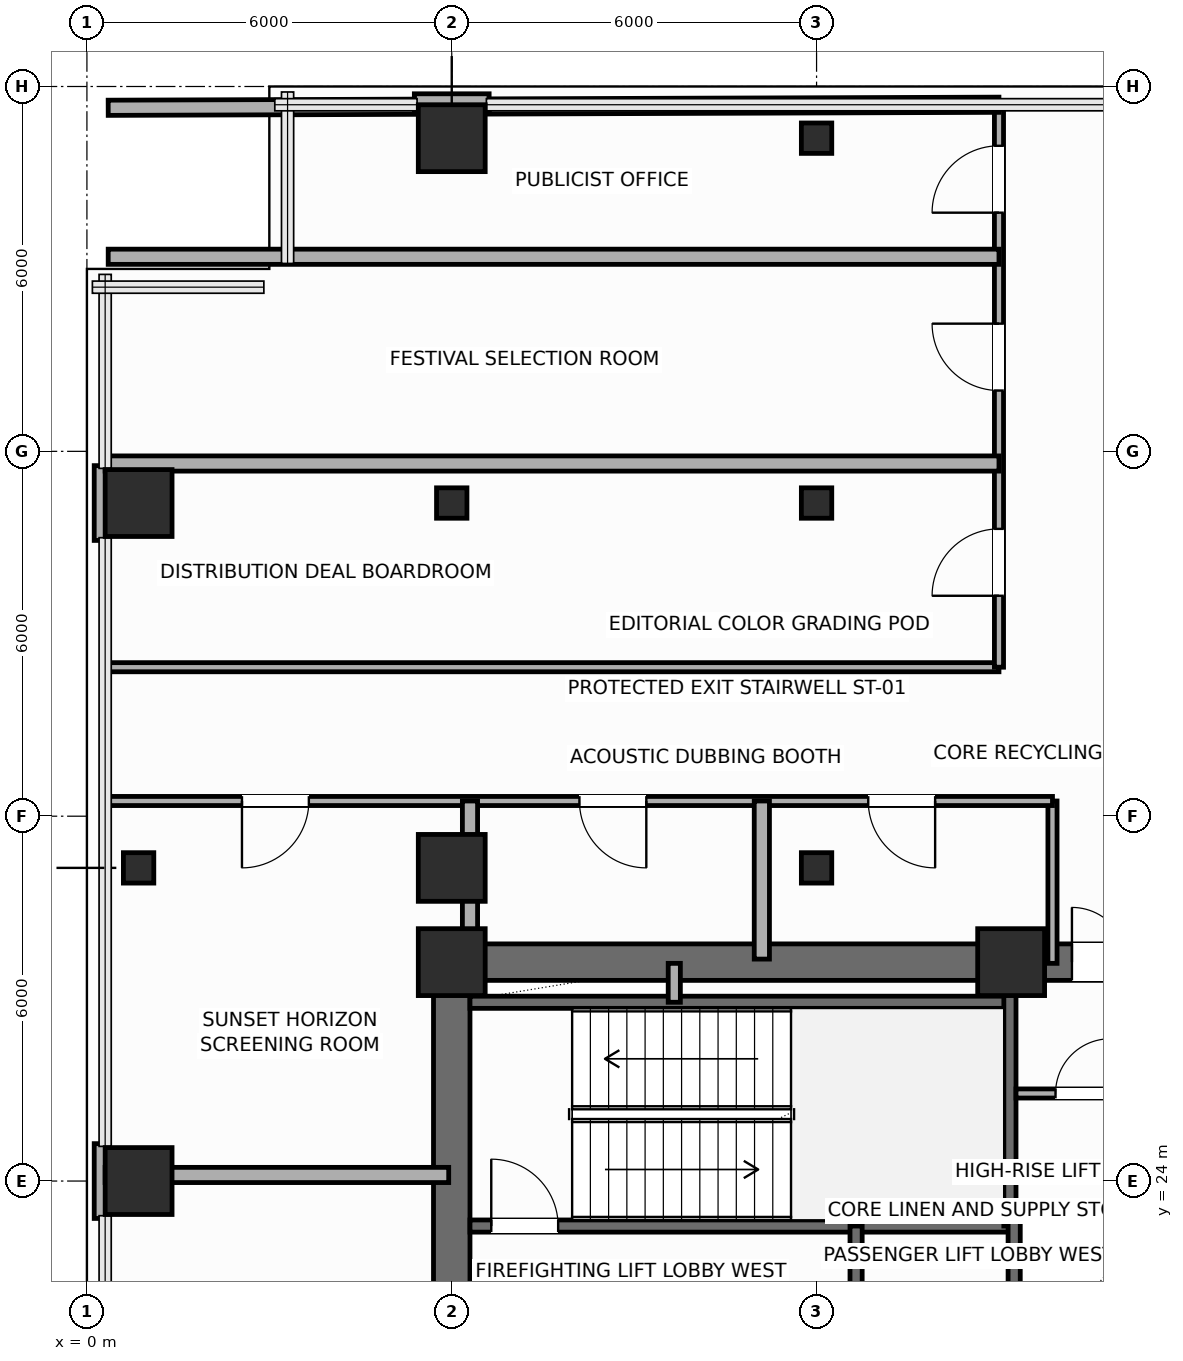
"""IFC4 building model, lengths in metres.
Left out: names, types, materials, properties, quantities, classifications, styles, units other than length and angle.
Written with IfcOpenShell. Run it as: python <this file> out.ifc"""

import sys

from ifc_helpers import new_model, si_unit, direction, frame, frame_2d, origin, origin_2d, place, context, subcontext, project, spatial, rectangle, hollow_rectangle, extrude, element, fill, save


model = new_model("IFC4")
c1 = context("Model", 3, precision=1e-05, world=origin(), true_north=direction((0.0, 1.0)))
c2 = subcontext(c1, "Body", "Model", "MODEL_VIEW")
j1 = project(units=[si_unit("LENGTHUNIT", "METRE"), si_unit("PLANEANGLEUNIT", "RADIAN")], contexts=[c1])
p1 = place(None, origin())
s1 = spatial("IfcSite", under=j1, at=p1, CompositionType="ELEMENT")
p2 = place(p1, origin())
s2 = spatial("IfcBuilding", under=s1, at=p2, CompositionType="ELEMENT")
p3 = place(p2, frame((0.0, 0.0, 126.9)))
s3 = spatial("IfcBuildingStorey", under=s2, at=p3, CompositionType="ELEMENT", Elevation=126.9)
for number, where, z_axis, x_axis in (
    (1, (6.0, 27.6, 0.0), (0.0, 0.0, 1.0), (1.0, 0.0, 0.0)),
    (2, (15.2, 27.6, 0.0), (0.0, 0.0, 1.0), (1.0, 0.0, 0.0)),
    (3, (0.85, 24.0, 0.0), (0.0, 0.0, 1.0), (1.0, 0.0, 0.0)),
):
    element("IfcColumn", number, at=place(p3, frame(where, z_axis=z_axis, x_axis=x_axis)), inside=s3, PredefinedType="COLUMN", context=c2, shape_type="SweptSolid", body=[
        extrude(rectangle(XDim=1.1, YDim=1.1, at=origin_2d()), origin(), (0.0, 0.0, 1.0), 3.75),
    ])
p4 = place(p3, frame((0.85, 29.15, 0.0), z_axis=(0.0, 0.0, 1.0), x_axis=(1.0, 0.0, 0.0)))
e4 = element("IfcColumn", 4, at=p4, inside=s3, PredefinedType="COLUMN", context=c2, shape_type="SweptSolid", body=[
    extrude(hollow_rectangle(XDim=0.5, YDim=0.5, WallThickness=0.025, InnerFilletRadius=0.025, OuterFilletRadius=0.04, at=origin_2d()), origin(), (0.0, 0.0, 1.0), 3.75),
])
for number, where, z_axis, x_axis in (
    (5, (0.85, 35.15, 0.0), (0.0, 0.0, 1.0), (1.0, 0.0, 0.0)),
    (6, (6.0, 29.15, 0.0), (0.0, 0.0, 1.0), (1.0, 0.0, 0.0)),
):
    element("IfcColumn", number, at=place(p3, frame(where, z_axis=z_axis, x_axis=x_axis)), inside=s3, PredefinedType="COLUMN", context=c2, shape_type="SweptSolid", body=[
        extrude(rectangle(XDim=1.1, YDim=1.1, at=origin_2d()), origin(), (0.0, 0.0, 1.0), 3.75),
    ])
p5 = place(p3, frame((6.0, 35.15, 0.0), z_axis=(0.0, 0.0, 1.0), x_axis=(1.0, 0.0, 0.0)))
e7 = element("IfcColumn", 7, at=p5, inside=s3, PredefinedType="COLUMN", context=c2, shape_type="SweptSolid", body=[
    extrude(hollow_rectangle(XDim=0.5, YDim=0.5, WallThickness=0.025, InnerFilletRadius=0.025, OuterFilletRadius=0.04, at=origin_2d()), origin(), (0.0, 0.0, 1.0), 3.75),
])
p6 = place(p3, frame((6.0, 41.15, 0.0), z_axis=(0.0, 0.0, 1.0), x_axis=(1.0, 0.0, 0.0)))
e8 = element("IfcColumn", 8, at=p6, inside=s3, PredefinedType="COLUMN", context=c2, shape_type="SweptSolid", body=[
    extrude(rectangle(XDim=1.1, YDim=1.1, at=origin_2d()), origin(), (0.0, 0.0, 1.0), 3.75),
])
for number, where, z_axis, x_axis in (
    (9, (12.0, 29.15, 0.0), (0.0, 0.0, 1.0), (1.0, 0.0, 0.0)),
    (10, (12.0, 35.15, 0.0), (0.0, 0.0, 1.0), (1.0, 0.0, 0.0)),
    (11, (12.0, 41.15, 0.0), (0.0, 0.0, 1.0), (1.0, 0.0, 0.0)),
):
    element("IfcColumn", number, at=place(p3, frame(where, z_axis=z_axis, x_axis=x_axis)), inside=s3, PredefinedType="COLUMN", context=c2, shape_type="SweptSolid", body=[
        extrude(hollow_rectangle(XDim=0.5, YDim=0.5, WallThickness=0.025, InnerFilletRadius=0.025, OuterFilletRadius=0.04, at=origin_2d()), origin(), (0.0, 0.0, 1.0), 3.75),
    ])
for number, where, z_axis, x_axis in (
    (12, (0.24, 23.385, 0.0), (0.0, 0.0, 1.0), (0.0, 1.0, 0.0)),
    (13, (0.24, 34.535, 0.0), (0.0, 0.0, 1.0), (0.0, 1.0, 0.0)),
    (14, (5.385, 41.76, 0.0), (0.0, 0.0, 1.0), (1.0, 0.0, 0.0)),
):
    element("IfcWall", number, at=place(p3, frame(where, z_axis=z_axis, x_axis=x_axis)), inside=s3, PredefinedType="SOLIDWALL", context=c2, shape_type="SweptSolid", body=[
        extrude(rectangle(XDim=1.23, YDim=0.24, at=frame_2d((0.615, 0.0))), origin(), (0.0, 0.0, 1.0), 3.525),
    ])
p7 = place(p3, frame((6.0, 27.6, 0.0), z_axis=(0.0, 0.0, 1.0), x_axis=(1.0, 0.0, 0.0)))
e15 = element("IfcWall", 15, at=p7, inside=s3, PredefinedType="SHEAR", context=c2, shape_type="SweptSolid", body=[
    extrude(rectangle(XDim=12.0, YDim=0.6, at=frame_2d((6.0, 0.0))), origin(), (0.0, 0.0, 1.0), 3.525),
])
p8 = place(p7, frame((10.2, 0.0, 0.0)))
e16 = element("IfcOpeningElement", 16, at=p8, cuts=e15, PredefinedType="OPENING", context=c2, shape_type="SweptSolid", body=[
    extrude(rectangle(XDim=0.9, YDim=2.15, at=frame_2d((0.45, 1.075))), frame((0.0, 0.31, 0.0), z_axis=(0.0, -1.0, 0.0), x_axis=(1.0, 0.0, 0.0)), (0.0, 0.0, 1.0), 0.62),
])
p9 = place(p3, frame((6.0, 18.0, 0.0), z_axis=(0.0, 0.0, 1.0), x_axis=(0.0, 1.0, 0.0)))
e17 = element("IfcWall", 17, at=p9, inside=s3, PredefinedType="SHEAR", context=c2, shape_type="SweptSolid", body=[
    extrude(rectangle(XDim=9.6, YDim=0.6, at=frame_2d((4.8, 0.0))), origin(), (0.0, 0.0, 1.0), 3.525),
])
p10 = place(p3, frame((6.3, 23.26, 0.0), z_axis=(0.0, 0.0, 1.0), x_axis=(1.0, 0.0, 0.0)))
e18 = element("IfcWall", 18, at=p10, inside=s3, PredefinedType="SHEAR", context=c2, shape_type="SweptSolid", body=[
    extrude(rectangle(XDim=8.88, YDim=0.2, at=frame_2d((4.44, 0.0))), origin(), (0.0, 0.0, 1.0), 3.525),
])
p11 = place(p10, frame((0.35, 0.0, 0.0)))
e19 = element("IfcOpeningElement", 19, at=p11, cuts=e18, PredefinedType="OPENING", context=c2, shape_type="SweptSolid", body=[
    extrude(rectangle(XDim=1.1, YDim=2.2, at=frame_2d((0.55, 1.1))), frame((0.0, 0.11, 0.0), z_axis=(0.0, -1.0, 0.0), x_axis=(1.0, 0.0, 0.0)), (0.0, 0.0, 1.0), 0.22),
])
p12 = place(p3, frame((6.3, 26.94, 0.0), z_axis=(0.0, 0.0, 1.0), x_axis=(1.0, 0.0, 0.0)))
e20 = element("IfcWall", 20, at=p12, inside=s3, PredefinedType="SHEAR", context=c2, shape_type="SweptSolid", body=[
    extrude(rectangle(XDim=8.88, YDim=0.2, at=frame_2d((4.44, 0.0))), origin(), (0.0, 0.0, 1.0), 3.525),
])
p13 = place(p3, frame((15.18, 23.26, 0.0), z_axis=(0.0, 0.0, 1.0), x_axis=(0.0, 1.0, 0.0)))
e21 = element("IfcWall", 21, at=p13, inside=s3, PredefinedType="SHEAR", context=c2, shape_type="SweptSolid", body=[
    extrude(rectangle(XDim=4.04, YDim=0.2, at=frame_2d((2.02, 0.0))), origin(), (0.0, 0.0, 1.0), 3.525),
])
p14 = place(p3, frame((12.65, 20.42, 0.0), z_axis=(0.0, 0.0, 1.0), x_axis=(0.0, 1.0, 0.0)))
e22 = element("IfcWall", 22, at=p14, inside=s3, PredefinedType="SHEAR", context=c2, shape_type="SweptSolid", body=[
    extrude(rectangle(XDim=2.84, YDim=0.2, at=frame_2d((1.42, 0.0))), origin(), (0.0, 0.0, 1.0), 3.525),
])
p15 = place(p14, frame((0.9, 0.0, 0.0)))
e23 = element("IfcOpeningElement", 23, at=p15, cuts=e22, PredefinedType="OPENING", context=c2, shape_type="SweptSolid", body=[
    extrude(rectangle(XDim=0.9, YDim=2.15, at=frame_2d((0.45, 1.075))), frame((0.0, 0.11, 0.0), z_axis=(0.0, -1.0, 0.0), x_axis=(1.0, 0.0, 0.0)), (0.0, 0.0, 1.0), 0.22),
])
p16 = place(p3, frame((9.66, 26.94, 0.0), z_axis=(0.0, 0.0, 1.0), x_axis=(0.0, 1.0, 0.0)))
e24 = element("IfcWall", 24, at=p16, inside=s3, PredefinedType="SOLIDWALL", context=c2, shape_type="SweptSolid", body=[
    extrude(rectangle(XDim=0.64, YDim=0.2, at=frame_2d((0.32, 0.0))), origin(), (0.0, 0.0, 1.0), 3.525),
])
p17 = place(p3, frame((15.25, 18.25, 0.0), z_axis=(0.0, 0.0, 1.0), x_axis=(0.0, 1.0, 0.0)))
e25 = element("IfcWall", 25, at=p17, inside=s3, PredefinedType="SHEAR", context=c2, shape_type="SweptSolid", body=[
    extrude(rectangle(XDim=5.2, YDim=0.2, at=frame_2d((2.6, 0.0))), origin(), (0.0, 0.0, 1.0), 3.525),
])
p18 = place(p3, frame((15.25, 23.45, 0.0), z_axis=(0.0, 0.0, 1.0), x_axis=(1.0, 0.0, 0.0)))
e26 = element("IfcWall", 26, at=p18, inside=s3, PredefinedType="SHEAR", context=c2, shape_type="SweptSolid", body=[
    extrude(rectangle(XDim=2.45, YDim=0.2, at=frame_2d((1.225, 0.0))), origin(), (0.0, 0.0, 1.0), 3.525),
])
p19 = place(p3, frame((15.28, 25.44, 0.0), z_axis=(0.0, 0.0, 1.0), x_axis=(1.0, 0.0, 0.0)))
e27 = element("IfcWall", 27, at=p19, inside=s3, PredefinedType="PARTITIONING", context=c2, shape_type="SweptSolid", body=[
    extrude(rectangle(XDim=2.42, YDim=0.15, at=frame_2d((1.21, 0.0))), origin(), (0.0, 0.0, 1.0), 3.525),
])
p20 = place(p19, frame((0.65, 0.0, 0.0)))
e28 = element("IfcOpeningElement", 28, at=p20, cuts=e27, PredefinedType="OPENING", context=c2, shape_type="SweptSolid", body=[
    extrude(rectangle(XDim=0.9, YDim=2.15, at=frame_2d((0.45, 1.075))), frame((0.0, 0.085, 0.0), z_axis=(0.0, -1.0, 0.0), x_axis=(1.0, 0.0, 0.0)), (0.0, 0.0, 1.0), 0.17),
])
p21 = place(p3, frame((15.88, 27.58, 0.0), z_axis=(0.0, 0.0, 1.0), x_axis=(0.0, 1.0, 0.0)))
e29 = element("IfcWall", 29, at=p21, inside=s3, PredefinedType="PARTITIONING", context=c2, shape_type="SweptSolid", body=[
    extrude(rectangle(XDim=2.67, YDim=0.15, at=frame_2d((1.335, 0.0))), origin(), (0.0, 0.0, 1.0), 3.525),
])
p22 = place(p3, frame((15.88, 30.25, 0.0), z_axis=(0.0, 0.0, 1.0), x_axis=(-1.0, 0.0, 0.0)))
e30 = element("IfcWall", 30, at=p22, inside=s3, PredefinedType="PARTITIONING", context=c2, shape_type="SweptSolid", body=[
    extrude(rectangle(XDim=15.58, YDim=0.15, at=frame_2d((7.79, 0.0))), origin(), (0.0, 0.0, 1.0), 3.525),
])
p23 = place(p22, frame((12.23, 0.0, 0.0)))
e31 = element("IfcOpeningElement", 31, at=p23, cuts=e30, PredefinedType="OPENING", context=c2, shape_type="SweptSolid", body=[
    extrude(rectangle(XDim=1.1, YDim=2.25, at=frame_2d((0.55, 1.125))), frame((0.0, 0.085, 0.0), z_axis=(0.0, -1.0, 0.0), x_axis=(1.0, 0.0, 0.0)), (0.0, 0.0, 1.0), 0.17),
])
p24 = place(p22, frame((6.68, 0.0, 0.0)))
e32 = element("IfcOpeningElement", 32, at=p24, cuts=e30, PredefinedType="OPENING", context=c2, shape_type="SweptSolid", body=[
    extrude(rectangle(XDim=1.1, YDim=2.25, at=frame_2d((0.55, 1.125))), frame((0.0, 0.085, 0.0), z_axis=(0.0, -1.0, 0.0), x_axis=(1.0, 0.0, 0.0)), (0.0, 0.0, 1.0), 0.17),
])
p25 = place(p22, frame((1.93, 0.0, 0.0)))
e33 = element("IfcOpeningElement", 33, at=p25, cuts=e30, PredefinedType="OPENING", context=c2, shape_type="SweptSolid", body=[
    extrude(rectangle(XDim=1.1, YDim=2.25, at=frame_2d((0.55, 1.125))), frame((0.0, 0.085, 0.0), z_axis=(0.0, -1.0, 0.0), x_axis=(1.0, 0.0, 0.0)), (0.0, 0.0, 1.0), 0.17),
])
p26 = place(p3, frame((0.3, 32.45, 0.0), z_axis=(0.0, 0.0, 1.0), x_axis=(1.0, 0.0, 0.0)))
e34 = element("IfcWall", 34, at=p26, inside=s3, PredefinedType="PARTITIONING", context=c2, shape_type="SweptSolid", body=[
    extrude(rectangle(XDim=14.7, YDim=0.15, at=frame_2d((7.35, 0.0))), origin(), (0.0, 0.0, 1.0), 3.525),
])
p27 = place(p3, frame((15.0, 32.45, 0.0), z_axis=(0.0, 0.0, 1.0), x_axis=(0.0, 1.0, 0.0)))
e35 = element("IfcWall", 35, at=p27, inside=s3, PredefinedType="PARTITIONING", context=c2, shape_type="SweptSolid", body=[
    extrude(rectangle(XDim=9.25, YDim=0.15, at=frame_2d((4.625, 0.0))), origin(), (0.0, 0.0, 1.0), 3.525),
])
p28 = place(p27, frame((1.175, 0.0, 0.0)))
e36 = element("IfcOpeningElement", 36, at=p28, cuts=e35, PredefinedType="OPENING", context=c2, shape_type="SweptSolid", body=[
    extrude(rectangle(XDim=1.1, YDim=2.25, at=frame_2d((0.55, 1.125))), frame((0.0, 0.085, 0.0), z_axis=(0.0, -1.0, 0.0), x_axis=(1.0, 0.0, 0.0)), (0.0, 0.0, 1.0), 0.17),
])
p29 = place(p27, frame((4.55, 0.0, 0.0)))
e37 = element("IfcOpeningElement", 37, at=p29, cuts=e35, PredefinedType="OPENING", context=c2, shape_type="SweptSolid", body=[
    extrude(rectangle(XDim=1.1, YDim=2.25, at=frame_2d((0.55, 1.125))), frame((0.0, 0.085, 0.0), z_axis=(0.0, -1.0, 0.0), x_axis=(1.0, 0.0, 0.0)), (0.0, 0.0, 1.0), 0.17),
])
p30 = place(p27, frame((7.475, 0.0, 0.0)))
e38 = element("IfcOpeningElement", 38, at=p30, cuts=e35, PredefinedType="OPENING", context=c2, shape_type="SweptSolid", body=[
    extrude(rectangle(XDim=1.1, YDim=2.25, at=frame_2d((0.55, 1.125))), frame((0.0, 0.085, 0.0), z_axis=(0.0, -1.0, 0.0), x_axis=(1.0, 0.0, 0.0)), (0.0, 0.0, 1.0), 0.17),
])
p31 = place(p3, frame((0.3, 24.1, 0.0), z_axis=(0.0, 0.0, 1.0), x_axis=(1.0, 0.0, 0.0)))
e39 = element("IfcWall", 39, at=p31, inside=s3, PredefinedType="PARTITIONING", context=c2, shape_type="SweptSolid", body=[
    extrude(rectangle(XDim=5.65, YDim=0.25, at=frame_2d((2.825, 0.0))), origin(), (0.0, 0.0, 1.0), 3.525),
])
p32 = place(p3, frame((6.3, 27.65, 0.0), z_axis=(0.0, 0.0, 1.0), x_axis=(0.0, 1.0, 0.0)))
e40 = element("IfcWall", 40, at=p32, inside=s3, PredefinedType="PARTITIONING", context=c2, shape_type="SweptSolid", body=[
    extrude(rectangle(XDim=2.6, YDim=0.25, at=frame_2d((1.3, 0.0))), origin(), (0.0, 0.0, 1.0), 3.017),
])
p33 = place(p3, frame((11.1, 27.65, 0.0), z_axis=(0.0, 0.0, 1.0), x_axis=(0.0, 1.0, 0.0)))
e41 = element("IfcWall", 41, at=p33, inside=s3, PredefinedType="PARTITIONING", context=c2, shape_type="SweptSolid", body=[
    extrude(rectangle(XDim=2.6, YDim=0.25, at=frame_2d((1.3, 0.0))), origin(), (0.0, 0.0, 1.0), 3.525),
])
p34 = place(p3, frame((0.3, 35.8, 0.0), z_axis=(0.0, 0.0, 1.0), x_axis=(1.0, 0.0, 0.0)))
e42 = element("IfcWall", 42, at=p34, inside=s3, PredefinedType="PARTITIONING", context=c2, shape_type="SweptSolid", body=[
    extrude(rectangle(XDim=14.7, YDim=0.25, at=frame_2d((7.35, 0.0))), origin(), (0.0, 0.0, 1.0), 3.525),
])
p35 = place(p3, frame((0.35, 39.2, 0.0), z_axis=(0.0, 0.0, 1.0), x_axis=(1.0, 0.0, 0.0)))
e43 = element("IfcWall", 43, at=p35, inside=s3, PredefinedType="PARTITIONING", context=c2, shape_type="SweptSolid", body=[
    extrude(rectangle(XDim=14.65, YDim=0.25, at=frame_2d((7.325, 0.0))), origin(), (0.0, 0.0, 1.0), 3.525),
])
p36 = place(p3, frame((0.35, 41.65, 0.0), z_axis=(0.0, 0.0, 1.0), x_axis=(0.999994073761, 0.003442737683, 0.0)))
e44 = element("IfcWall", 44, at=p36, inside=s3, PredefinedType="PARTITIONING", context=c2, shape_type="SweptSolid", body=[
    extrude(rectangle(XDim=5.035, YDim=0.25, at=frame_2d((2.518, 0.0))), origin(), (0.0, 0.0, 1.0), 3.525),
])
p37 = place(p3, frame((6.615, 41.671, 0.0), z_axis=(0.0, 0.0, 1.0), x_axis=(0.999994197557, 0.003406589638, 0.0)))
e45 = element("IfcWall", 45, at=p37, inside=s3, PredefinedType="PARTITIONING", context=c2, shape_type="SweptSolid", body=[
    extrude(rectangle(XDim=8.385, YDim=0.25, at=frame_2d((4.192, 0.0))), origin(), (0.0, 0.0, 1.0), 3.525),
])
p38 = place(p8, origin())
e46 = element("IfcDoor", 46, at=p38, inside=s3, OperationType="SINGLE_SWING_LEFT", PredefinedType="DOOR", context=c2, shape_type="SweptSolid", body=[
    extrude(rectangle(XDim=0.9, YDim=2.15, at=frame_2d((0.45, 1.075))), frame((0.0, 0.025, 0.0), z_axis=(0.0, -1.0, 0.0), x_axis=(1.0, 0.0, 0.0)), (0.0, 0.0, 1.0), 0.05),
])
fill(e16, e46)
p39 = place(p11, origin())
e47 = element("IfcDoor", 47, at=p39, inside=s3, OperationType="SINGLE_SWING_LEFT", PredefinedType="DOOR", context=c2, shape_type="SweptSolid", body=[
    extrude(rectangle(XDim=1.1, YDim=2.2, at=frame_2d((0.55, 1.1))), frame((0.0, 0.025, 0.0), z_axis=(0.0, -1.0, 0.0), x_axis=(1.0, 0.0, 0.0)), (0.0, 0.0, 1.0), 0.05),
])
fill(e19, e47)
p40 = place(p20, origin())
e48 = element("IfcDoor", 48, at=p40, inside=s3, OperationType="SINGLE_SWING_RIGHT", PredefinedType="DOOR", context=c2, shape_type="SweptSolid", body=[
    extrude(rectangle(XDim=0.9, YDim=2.15, at=frame_2d((0.45, 1.075))), frame((0.0, 0.025, 0.0), z_axis=(0.0, -1.0, 0.0), x_axis=(1.0, 0.0, 0.0)), (0.0, 0.0, 1.0), 0.05),
])
fill(e28, e48)
p41 = place(p23, origin())
e49 = element("IfcDoor", 49, at=p41, inside=s3, OperationType="SINGLE_SWING_RIGHT", PredefinedType="DOOR", context=c2, shape_type="SweptSolid", body=[
    extrude(rectangle(XDim=1.1, YDim=2.25, at=frame_2d((0.55, 1.125))), frame((0.0, 0.025, 0.0), z_axis=(0.0, -1.0, 0.0), x_axis=(1.0, 0.0, 0.0)), (0.0, 0.0, 1.0), 0.05),
])
fill(e31, e49)
p42 = place(p24, origin())
e50 = element("IfcDoor", 50, at=p42, inside=s3, OperationType="SINGLE_SWING_LEFT", PredefinedType="DOOR", context=c2, shape_type="SweptSolid", body=[
    extrude(rectangle(XDim=1.1, YDim=2.25, at=frame_2d((0.55, 1.125))), frame((0.0, 0.025, 0.0), z_axis=(0.0, -1.0, 0.0), x_axis=(1.0, 0.0, 0.0)), (0.0, 0.0, 1.0), 0.05),
])
fill(e32, e50)
p43 = place(p25, origin())
e51 = element("IfcDoor", 51, at=p43, inside=s3, OperationType="SINGLE_SWING_LEFT", PredefinedType="DOOR", context=c2, shape_type="SweptSolid", body=[
    extrude(rectangle(XDim=1.1, YDim=2.25, at=frame_2d((0.55, 1.125))), frame((0.0, 0.025, 0.0), z_axis=(0.0, -1.0, 0.0), x_axis=(1.0, 0.0, 0.0)), (0.0, 0.0, 1.0), 0.05),
])
fill(e33, e51)
p44 = place(p28, origin())
e52 = element("IfcDoor", 52, at=p44, inside=s3, OperationType="SINGLE_SWING_LEFT", PredefinedType="DOOR", context=c2, shape_type="SweptSolid", body=[
    extrude(rectangle(XDim=1.1, YDim=2.25, at=frame_2d((0.55, 1.125))), frame((0.0, 0.025, 0.0), z_axis=(0.0, -1.0, 0.0), x_axis=(1.0, 0.0, 0.0)), (0.0, 0.0, 1.0), 0.05),
])
fill(e36, e52)
p45 = place(p29, origin())
e53 = element("IfcDoor", 53, at=p45, inside=s3, OperationType="SINGLE_SWING_RIGHT", PredefinedType="DOOR", context=c2, shape_type="SweptSolid", body=[
    extrude(rectangle(XDim=1.1, YDim=2.25, at=frame_2d((0.55, 1.125))), frame((0.0, 0.025, 0.0), z_axis=(0.0, -1.0, 0.0), x_axis=(1.0, 0.0, 0.0)), (0.0, 0.0, 1.0), 0.05),
])
fill(e37, e53)
p46 = place(p30, origin())
e54 = element("IfcDoor", 54, at=p46, inside=s3, OperationType="SINGLE_SWING_LEFT", PredefinedType="DOOR", context=c2, shape_type="SweptSolid", body=[
    extrude(rectangle(XDim=1.1, YDim=2.25, at=frame_2d((0.55, 1.125))), frame((0.0, 0.025, 0.0), z_axis=(0.0, -1.0, 0.0), x_axis=(1.0, 0.0, 0.0)), (0.0, 0.0, 1.0), 0.05),
])
fill(e38, e54)
save(model, sys.argv[1])
